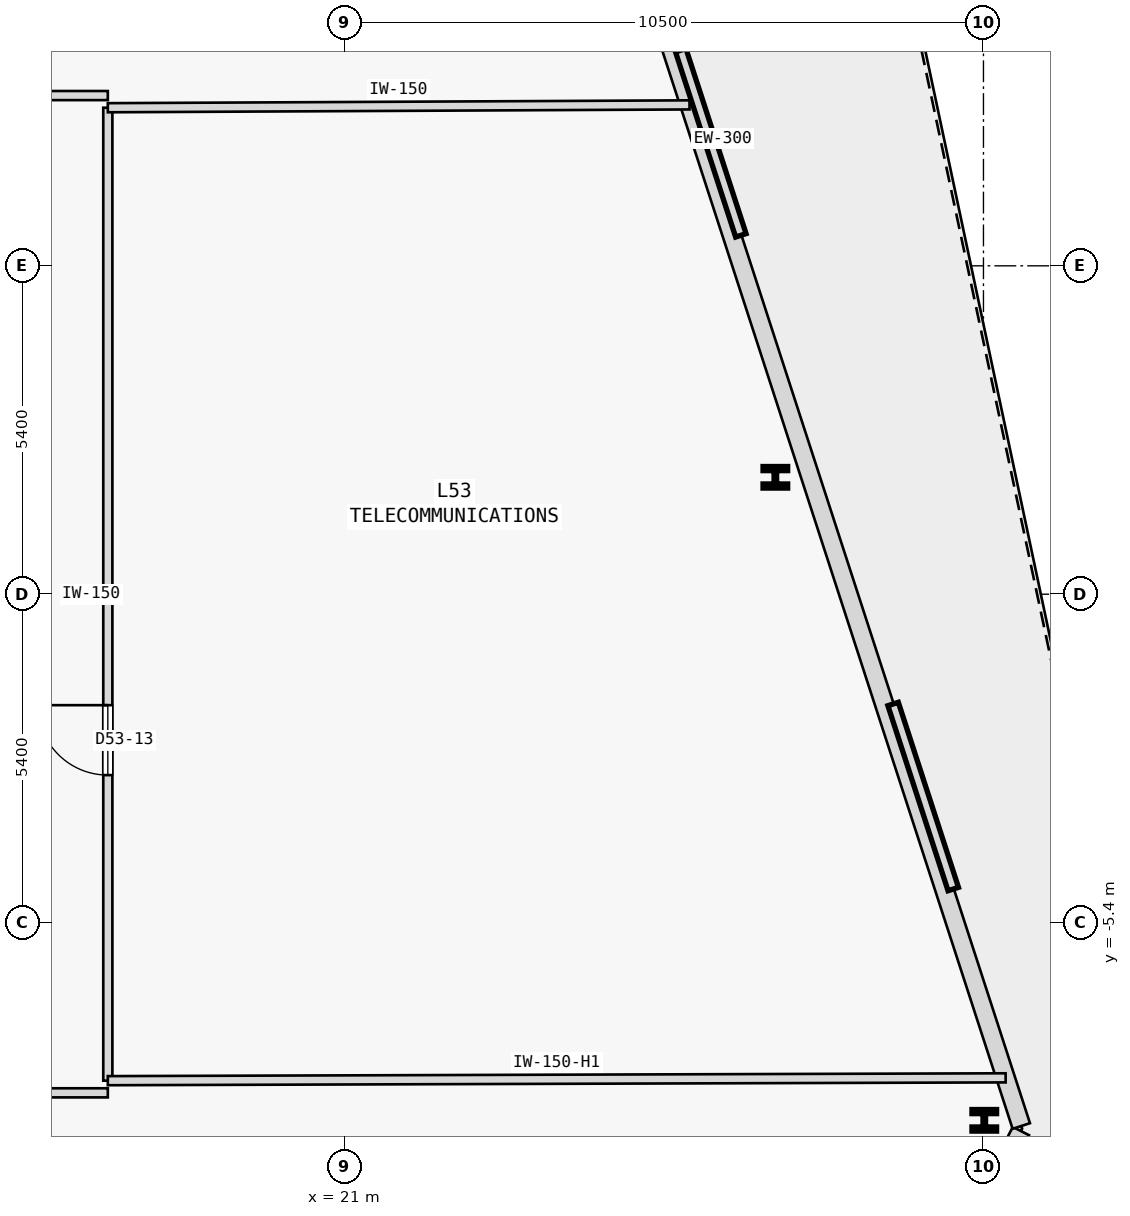
"""IFC4 building model, lengths in metres.
Left out: names, types, materials, properties, quantities, classifications, styles, units other than length and angle.
Written with IfcOpenShell. Run it as: python <this file> out.ifc"""

import sys

from ifc_helpers import new_model, si_unit, direction, frame, frame_2d, origin, origin_2d, place, context, subcontext, project, spatial, rectangle, i_section, extrude, element, fill, save


model = new_model("IFC4")
c1 = context("Model", 3, precision=1e-05, world=origin(), true_north=direction((0.0, 1.0)))
c2 = subcontext(c1, "Body", "Model", "MODEL_VIEW")
j1 = project(units=[si_unit("LENGTHUNIT", "METRE"), si_unit("PLANEANGLEUNIT", "RADIAN")], contexts=[c1])
p1 = place(None, origin())
s1 = spatial("IfcSite", under=j1, at=p1, CompositionType="ELEMENT")
p2 = place(p1, origin())
s2 = spatial("IfcBuilding", under=s1, at=p2, CompositionType="ELEMENT")
p3 = place(p2, frame((0.0, 0.0, 202.4)))
s3 = spatial("IfcBuildingStorey", under=s2, at=p3, CompositionType="ELEMENT", Elevation=202.4)
for number, where, z_axis, x_axis in (
    (1, (31.513, -8.652, 0.0), (0.0, 0.0, 1.0), (1.0, 0.0, 0.0)),
    (2, (28.078, 1.922, 0.0), (0.0, 0.0, 1.0), (1.0, 0.0, 0.0)),
):
    element("IfcColumn", number, at=place(p3, frame(where, z_axis=z_axis, x_axis=x_axis)), inside=s3, PredefinedType="COLUMN", context=c2, shape_type="SweptSolid", body=[
        extrude(i_section(OverallWidth=0.405, OverallDepth=0.355, WebThickness=0.042, FlangeThickness=0.068, FilletRadius=0.015, at=origin_2d()), origin(), (0.0, 0.0, 1.0), 4.4),
    ])
p4 = place(p3, frame((30.23, -12.529, 0.0), z_axis=(0.0, 0.0, 1.0), x_axis=(0.453950442261, 0.891026933359, 0.0)))
e3 = element("IfcWall", 3, at=p4, inside=s3, PredefinedType="STANDARD", context=c2, shape_type="SweptSolid", body=[
    extrude(rectangle(XDim=4.152, YDim=0.3, at=frame_2d((2.076, 0.0))), origin(), (0.0, 0.0, 1.0), 4.15),
])
p5 = place(p3, frame((32.122, -8.746, 0.0), z_axis=(0.0, 0.0, 1.0), x_axis=(-0.309017534148, 0.951056340912, 0.0)))
e4 = element("IfcWall", 4, at=p5, inside=s3, PredefinedType="STANDARD", context=c2, shape_type="SweptSolid", body=[
    extrude(rectangle(XDim=33.91, YDim=0.3, at=frame_2d((16.955, 0.0))), origin(), (0.0, 0.0, 1.0), 4.15),
])
p6 = place(p3, frame((17.806, 25.46, 0.0), z_axis=(0.0, 0.0, 1.0), x_axis=(-0.951056753609, -0.309016263999, 0.0)))
e5 = element("IfcWall", 5, at=p6, inside=s3, PredefinedType="STANDARD", context=c2, shape_type="SweptSolid", body=[
    extrude(rectangle(XDim=55.91, YDim=0.3, at=frame_2d((27.955, 0.0))), origin(), (0.0, 0.0, 1.0), 4.15),
])
p7 = place(p6, frame((29.949, 0.0, 0.0)))
e6 = element("IfcOpeningElement", 6, at=p7, cuts=e5, PredefinedType="OPENING", context=c2, shape_type="SweptSolid", body=[
    extrude(rectangle(XDim=1.1, YDim=2.2, at=frame_2d((0.55, 1.1))), frame((0.0, 0.16, 0.0), z_axis=(0.0, -1.0, 0.0), x_axis=(1.0, 0.0, 0.0)), (0.0, 0.0, 1.0), 0.32),
])
p8 = place(p3, frame((1.0, 8.2, 0.0), z_axis=(0.0, 0.0, 1.0), x_axis=(1.0, 0.0, 0.0)))
e7 = element("IfcWall", 7, at=p8, inside=s3, PredefinedType="PARTITIONING", context=c2, shape_type="SweptSolid", body=[
    extrude(rectangle(XDim=16.1, YDim=0.15, at=frame_2d((8.05, 0.0))), origin(), (0.0, 0.0, 1.0), 4.15),
])
p9 = place(p8, frame((7.475, 0.0, 0.0)))
e8 = element("IfcOpeningElement", 8, at=p9, cuts=e7, PredefinedType="OPENING", context=c2, shape_type="SweptSolid", body=[
    extrude(rectangle(XDim=1.15, YDim=2.15, at=frame_2d((0.575, 1.075))), frame((0.0, 0.085, 0.0), z_axis=(0.0, -1.0, 0.0), x_axis=(1.0, 0.0, 0.0)), (0.0, 0.0, 1.0), 0.17),
])
p10 = place(p3, frame((-0.5, -8.2, 0.0), z_axis=(0.0, 0.0, 1.0), x_axis=(1.0, 0.0, 0.0)))
e9 = element("IfcWall", 9, at=p10, inside=s3, PredefinedType="PARTITIONING", context=c2, shape_type="SweptSolid", body=[
    extrude(rectangle(XDim=17.6, YDim=0.15, at=frame_2d((8.8, 0.0))), origin(), (0.0, 0.0, 1.0), 4.15),
])
p11 = place(p10, frame((8.225, 0.0, 0.0)))
e10 = element("IfcOpeningElement", 10, at=p11, cuts=e9, PredefinedType="OPENING", context=c2, shape_type="SweptSolid", body=[
    extrude(rectangle(XDim=1.15, YDim=2.15, at=frame_2d((0.575, 1.075))), frame((0.0, 0.085, 0.0), z_axis=(0.0, -1.0, 0.0), x_axis=(1.0, 0.0, 0.0)), (0.0, 0.0, 1.0), 0.17),
])
p12 = place(p3, frame((17.1, -8.0, 0.0), z_axis=(0.0, 0.0, 1.0), x_axis=(0.0, 1.0, 0.0)))
e11 = element("IfcWall", 11, at=p12, inside=s3, PredefinedType="PARTITIONING", context=c2, shape_type="SweptSolid", body=[
    extrude(rectangle(XDim=16.0, YDim=0.15, at=frame_2d((8.0, 0.0))), origin(), (0.0, 0.0, 1.0), 4.15),
])
p13 = place(p12, frame((5.025, 0.0, 0.0)))
e12 = element("IfcOpeningElement", 12, at=p13, cuts=e11, PredefinedType="OPENING", context=c2, shape_type="SweptSolid", body=[
    extrude(rectangle(XDim=1.15, YDim=2.15, at=frame_2d((0.575, 1.075))), frame((0.0, 0.085, 0.0), z_axis=(0.0, -1.0, 0.0), x_axis=(1.0, 0.0, 0.0)), (0.0, 0.0, 1.0), 0.17),
])
p14 = place(p3, frame((17.1, 8.0, 0.0), z_axis=(0.0, 0.0, 1.0), x_axis=(0.999988243005, 0.004849108421, 0.0)))
e13 = element("IfcWall", 13, at=p14, inside=s3, PredefinedType="PARTITIONING", context=c2, shape_type="SweptSolid", body=[
    extrude(rectangle(XDim=9.566, YDim=0.15, at=frame_2d((4.783, 0.0))), origin(), (0.0, 0.0, 1.0), 4.15),
])
p15 = place(p3, frame((17.1, -8.0, 0.0), z_axis=(0.0, 0.0, 1.0), x_axis=(0.999995064765, 0.003141726673, 0.0)))
e14 = element("IfcWall", 14, at=p15, inside=s3, PredefinedType="PARTITIONING", context=c2, shape_type="SweptSolid", body=[
    extrude(rectangle(XDim=14.765, YDim=0.15, at=frame_2d((7.382, 0.0))), origin(), (0.0, 0.0, 1.0), 3.7),
])
p16 = place(p13, origin())
e15 = element("IfcDoor", 15, at=p16, inside=s3, OperationType="SINGLE_SWING_RIGHT", PredefinedType="DOOR", context=c2, shape_type="SweptSolid", body=[
    extrude(rectangle(XDim=1.15, YDim=2.15, at=frame_2d((0.575, 1.075))), frame((0.0, 0.025, 0.0), z_axis=(0.0, -1.0, 0.0), x_axis=(1.0, 0.0, 0.0)), (0.0, 0.0, 1.0), 0.05),
])
fill(e12, e15)
save(model, sys.argv[1])
